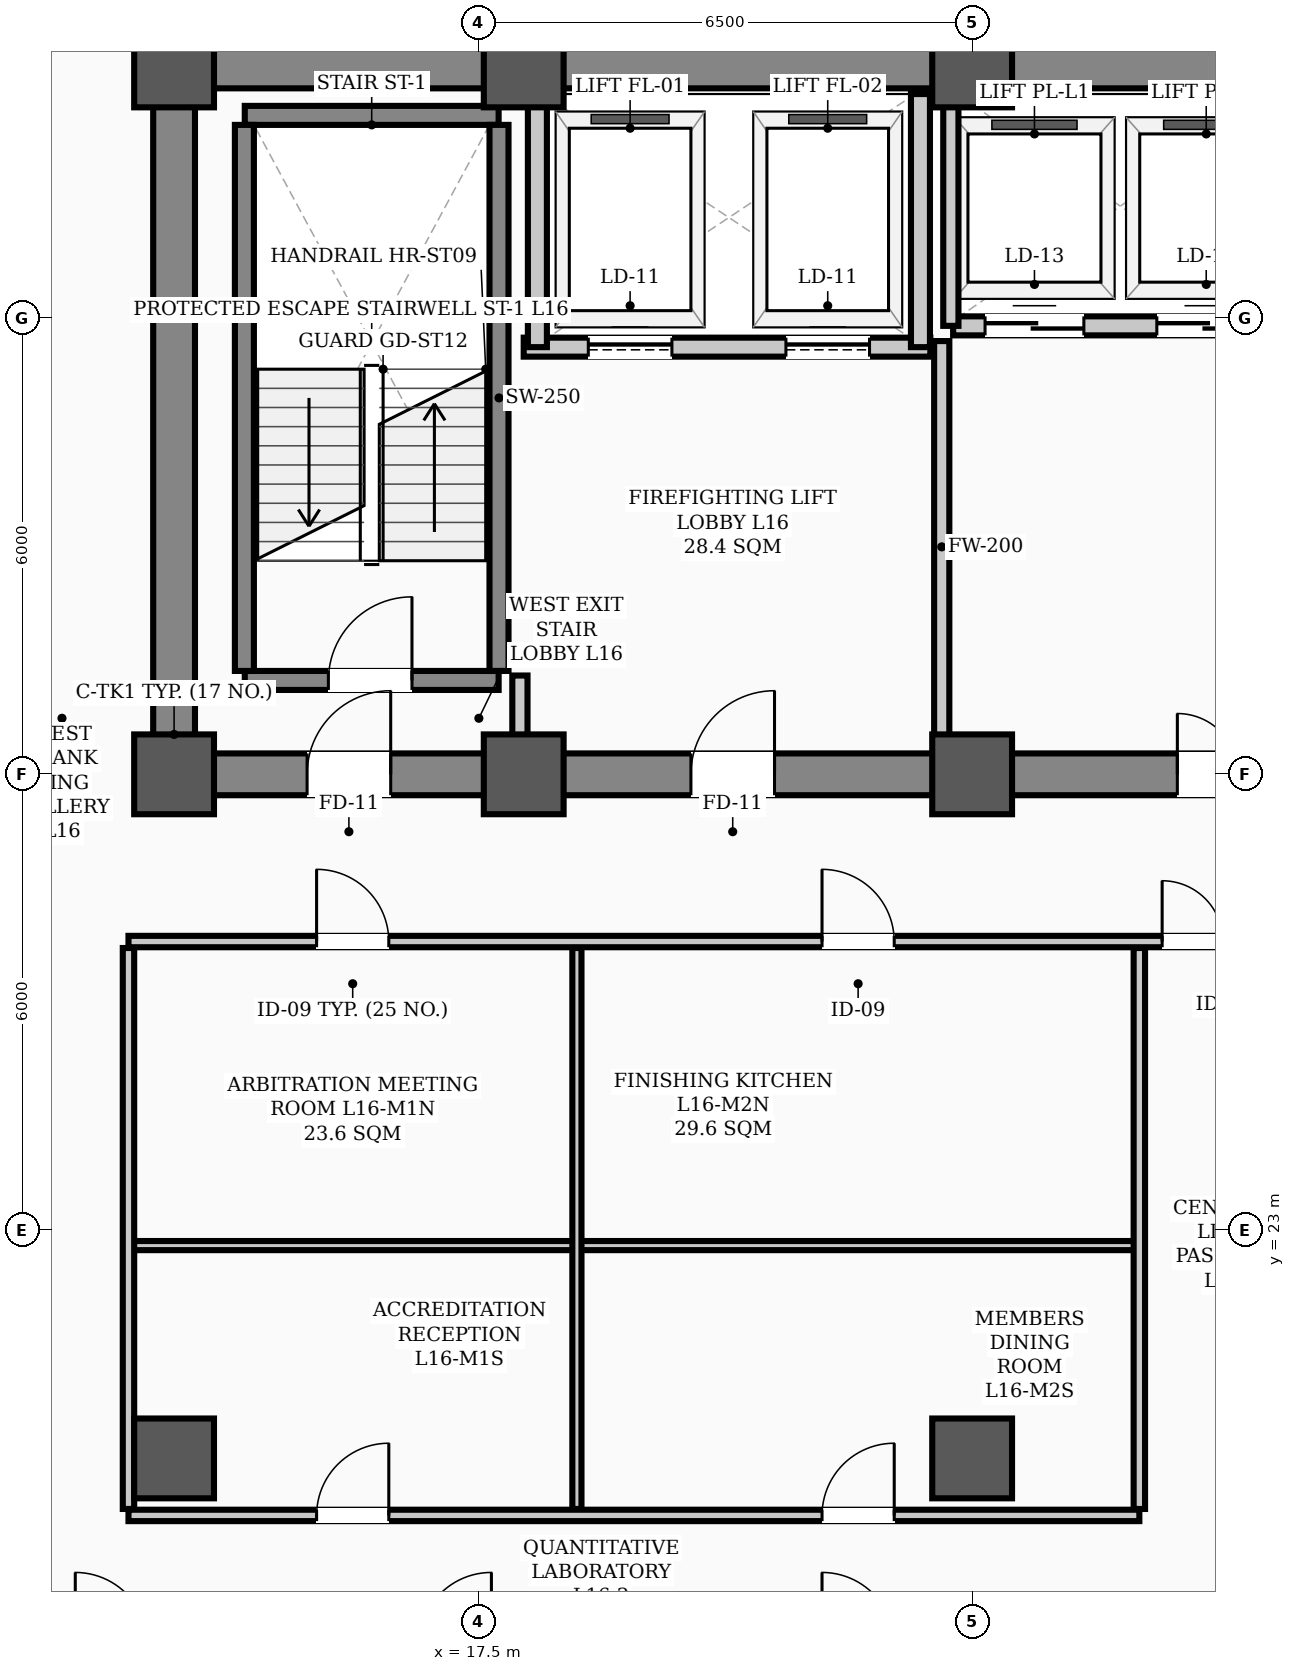
"""IFC4 building model, lengths in metres.
Left out: names, types, materials, properties, quantities, classifications, styles, units other than length and angle.
Written with IfcOpenShell. Run it as: python <this file> out.ifc"""

import sys

from ifc_helpers import new_model, si_unit, direction, frame, frame_2d, origin, origin_2d, place, context, subcontext, project, spatial, rectangle, hollow_rectangle, extrude, element, fill, save


model = new_model("IFC4")
c1 = context("Model", 3, precision=1e-05, world=origin(), true_north=direction((0.0, 1.0)))
c2 = subcontext(c1, "Body", "Model", "MODEL_VIEW")
j1 = project(units=[si_unit("LENGTHUNIT", "METRE"), si_unit("PLANEANGLEUNIT", "RADIAN")], contexts=[c1])
p1 = place(None, origin())
s1 = spatial("IfcSite", under=j1, at=p1, CompositionType="ELEMENT")
p2 = place(p1, origin())
s2 = spatial("IfcBuilding", under=s1, at=p2, CompositionType="ELEMENT")
p3 = place(p2, frame((0.0, 0.0, 65.5)))
s3 = spatial("IfcBuildingStorey", under=s2, at=p3, CompositionType="ELEMENT", Elevation=65.5)
for number, where, z_axis, x_axis in (
    (1, (13.5, 29.0, 0.0), (0.0, 0.0, 1.0), (1.0, 0.0, 0.0)),
    (2, (13.5, 38.3, 0.0), (0.0, 0.0, 1.0), (1.0, 0.0, 0.0)),
    (3, (18.1, 29.0, 0.0), (0.0, 0.0, 1.0), (1.0, 0.0, 0.0)),
    (4, (18.1, 38.3, 0.0), (0.0, 0.0, 1.0), (1.0, 0.0, 0.0)),
    (5, (24.0, 29.0, 0.0), (0.0, 0.0, 1.0), (1.0, 0.0, 0.0)),
    (6, (24.0, 38.3, 0.0), (0.0, 0.0, 1.0), (1.0, 0.0, 0.0)),
    (7, (13.5, 20.0, 0.0), (0.0, 0.0, 1.0), (1.0, 0.0, 0.0)),
    (8, (24.0, 20.0, 0.0), (0.0, 0.0, 1.0), (1.0, 0.0, 0.0)),
):
    element("IfcColumn", number, at=place(p3, frame(where, z_axis=z_axis, x_axis=x_axis)), inside=s3, PredefinedType="COLUMN", context=c2, shape_type="SweptSolid", body=[
        extrude(hollow_rectangle(XDim=1.05, YDim=1.05, WallThickness=0.038, InnerFilletRadius=0.019, OuterFilletRadius=0.057, at=origin_2d()), origin(), (0.0, 0.0, 1.0), 3.9),
    ])
p4 = place(p3, frame((13.5, 29.0, 0.0), z_axis=(0.0, 0.0, 1.0), x_axis=(1.0, 0.0, 0.0)))
e9 = element("IfcWall", 9, at=p4, inside=s3, PredefinedType="SHEAR", context=c2, shape_type="SweptSolid", body=[
    extrude(rectangle(XDim=30.5, YDim=0.55, at=frame_2d((15.25, 0.0))), origin(), (0.0, 0.0, 1.0), 3.72),
])
p5 = place(p4, frame((1.75, 0.0, 0.0)))
e10 = element("IfcOpeningElement", 10, at=p5, cuts=e9, PredefinedType="OPENING", context=c2, shape_type="SweptSolid", body=[
    extrude(rectangle(XDim=1.1, YDim=2.08, at=frame_2d((0.55, 1.04))), frame((0.0, 0.285, 0.0), z_axis=(0.0, -1.0, 0.0), x_axis=(1.0, 0.0, 0.0)), (0.0, 0.0, 1.0), 0.57),
])
p6 = place(p4, frame((26.7, 0.0, 0.0)))
e11 = element("IfcOpeningElement", 11, at=p6, cuts=e9, PredefinedType="OPENING", context=c2, shape_type="SweptSolid", body=[
    extrude(rectangle(XDim=1.1, YDim=2.08, at=frame_2d((0.55, 1.04))), frame((0.0, 0.285, 0.0), z_axis=(0.0, -1.0, 0.0), x_axis=(1.0, 0.0, 0.0)), (0.0, 0.0, 1.0), 0.57),
])
p7 = place(p4, frame((6.8, 0.0, 0.0)))
e12 = element("IfcOpeningElement", 12, at=p7, cuts=e9, PredefinedType="OPENING", context=c2, shape_type="SweptSolid", body=[
    extrude(rectangle(XDim=1.1, YDim=2.08, at=frame_2d((0.55, 1.04))), frame((0.0, 0.285, 0.0), z_axis=(0.0, -1.0, 0.0), x_axis=(1.0, 0.0, 0.0)), (0.0, 0.0, 1.0), 0.57),
])
p8 = place(p4, frame((13.2, 0.0, 0.0)))
e13 = element("IfcOpeningElement", 13, at=p8, cuts=e9, PredefinedType="OPENING", context=c2, shape_type="SweptSolid", body=[
    extrude(rectangle(XDim=1.6, YDim=2.08, at=frame_2d((0.8, 1.04))), frame((0.0, 0.285, 0.0), z_axis=(0.0, -1.0, 0.0), x_axis=(1.0, 0.0, 0.0)), (0.0, 0.0, 1.0), 0.57),
])
p9 = place(p4, frame((19.53, 0.0, 0.0)))
e14 = element("IfcOpeningElement", 14, at=p9, cuts=e9, PredefinedType="OPENING", context=c2, shape_type="SweptSolid", body=[
    extrude(rectangle(XDim=0.9, YDim=2.08, at=frame_2d((0.45, 1.04))), frame((0.0, 0.285, 0.0), z_axis=(0.0, -1.0, 0.0), x_axis=(1.0, 0.0, 0.0)), (0.0, 0.0, 1.0), 0.57),
])
p10 = place(p4, frame((21.57, 0.0, 0.0)))
e15 = element("IfcOpeningElement", 15, at=p10, cuts=e9, PredefinedType="OPENING", context=c2, shape_type="SweptSolid", body=[
    extrude(rectangle(XDim=0.9, YDim=2.08, at=frame_2d((0.45, 1.04))), frame((0.0, 0.285, 0.0), z_axis=(0.0, -1.0, 0.0), x_axis=(1.0, 0.0, 0.0)), (0.0, 0.0, 1.0), 0.57),
])
p11 = place(p3, frame((13.5, 38.3, 0.0), z_axis=(0.0, 0.0, 1.0), x_axis=(1.0, 0.0, 0.0)))
e16 = element("IfcWall", 16, at=p11, inside=s3, PredefinedType="SHEAR", context=c2, shape_type="SweptSolid", body=[
    extrude(rectangle(XDim=30.5, YDim=0.55, at=frame_2d((15.25, 0.0))), origin(), (0.0, 0.0, 1.0), 3.72),
])
p12 = place(p3, frame((13.5, 29.35, 0.0), z_axis=(0.0, 0.0, 1.0), x_axis=(0.0, 1.0, 0.0)))
e17 = element("IfcWall", 17, at=p12, inside=s3, PredefinedType="SHEAR", context=c2, shape_type="SweptSolid", body=[
    extrude(rectangle(XDim=8.6, YDim=0.55, at=frame_2d((4.3, 0.0))), origin(), (0.0, 0.0, 1.0), 3.72),
])
p13 = place(p3, frame((14.43, 30.235, 0.0), z_axis=(0.0, 0.0, 1.0), x_axis=(1.0, 0.0, 0.0)))
e18 = element("IfcWall", 18, at=p13, inside=s3, PredefinedType="STANDARD", context=c2, shape_type="SweptSolid", body=[
    extrude(rectangle(XDim=3.34, YDim=0.25, at=frame_2d((1.67, 0.0))), origin(), (0.0, 0.0, 1.0), 3.72),
])
p14 = place(p13, frame((1.1, 0.0, 0.0)))
e19 = element("IfcOpeningElement", 19, at=p14, cuts=e18, PredefinedType="OPENING", context=c2, shape_type="SweptSolid", body=[
    extrude(rectangle(XDim=1.1, YDim=2.08, at=frame_2d((0.55, 1.04))), frame((0.0, 0.135, 0.0), z_axis=(0.0, -1.0, 0.0), x_axis=(1.0, 0.0, 0.0)), (0.0, 0.0, 1.0), 0.27),
])
p15 = place(p3, frame((14.43, 37.669, 0.0), z_axis=(0.0, 0.0, 1.0), x_axis=(1.0, 0.0, 0.0)))
e20 = element("IfcWall", 20, at=p15, inside=s3, PredefinedType="STANDARD", context=c2, shape_type="SweptSolid", body=[
    extrude(rectangle(XDim=3.34, YDim=0.25, at=frame_2d((1.67, 0.0))), origin(), (0.0, 0.0, 1.0), 3.72),
])
for number, where, z_axis, x_axis in (
    (21, (14.425, 30.36, 0.0), (0.0, 0.0, 1.0), (0.0, 1.0, 0.0)),
    (22, (17.775, 30.36, 0.0), (0.0, 0.0, 1.0), (0.0, 1.0, 0.0)),
):
    element("IfcWall", number, at=place(p3, frame(where, z_axis=z_axis, x_axis=x_axis)), inside=s3, PredefinedType="STANDARD", context=c2, shape_type="SweptSolid", body=[
        extrude(rectangle(XDim=7.184, YDim=0.25, at=frame_2d((3.592, 0.0))), origin(), (0.0, 0.0, 1.0), 3.72),
    ])
p16 = place(p3, frame((18.1, 34.62, 0.0), z_axis=(0.0, 0.0, 1.0), x_axis=(1.0, 0.0, 0.0)))
e23 = element("IfcWall", 23, at=p16, inside=s3, PredefinedType="STANDARD", context=c2, shape_type="SweptSolid", body=[
    extrude(rectangle(XDim=5.35, YDim=0.25, at=frame_2d((2.675, 0.0))), origin(), (0.0, 0.0, 1.0), 3.72),
])
p17 = place(p16, frame((0.85, 0.0, 0.0)))
e24 = element("IfcOpeningElement", 24, at=p17, cuts=e23, PredefinedType="OPENING", context=c2, shape_type="SweptSolid", body=[
    extrude(rectangle(XDim=1.1, YDim=2.08, at=frame_2d((0.55, 1.04))), frame((0.0, 0.135, 0.0), z_axis=(0.0, -1.0, 0.0), x_axis=(1.0, 0.0, 0.0)), (0.0, 0.0, 1.0), 0.27),
])
p18 = place(p16, frame((3.45, 0.0, 0.0)))
e25 = element("IfcOpeningElement", 25, at=p18, cuts=e23, PredefinedType="OPENING", context=c2, shape_type="SweptSolid", body=[
    extrude(rectangle(XDim=1.1, YDim=2.08, at=frame_2d((0.55, 1.04))), frame((0.0, 0.135, 0.0), z_axis=(0.0, -1.0, 0.0), x_axis=(1.0, 0.0, 0.0)), (0.0, 0.0, 1.0), 0.27),
])
for number, where, z_axis, x_axis in (
    (26, (18.28, 34.62, 0.0), (0.0, 0.0, 1.0), (0.0, 1.0, 0.0)),
    (27, (23.32, 34.62, 0.0), (0.0, 0.0, 1.0), (0.0, 1.0, 0.0)),
):
    element("IfcWall", number, at=place(p3, frame(where, z_axis=z_axis, x_axis=x_axis)), inside=s3, PredefinedType="STANDARD", context=c2, shape_type="SweptSolid", body=[
        extrude(rectangle(XDim=3.33, YDim=0.25, at=frame_2d((1.665, 0.0))), origin(), (0.0, 0.0, 1.0), 3.3),
    ])
p19 = place(p3, frame((23.75, 34.9, 0.0), z_axis=(0.0, 0.0, 1.0), x_axis=(1.0, 0.0, 0.0)))
e28 = element("IfcWall", 28, at=p19, inside=s3, PredefinedType="STANDARD", context=c2, shape_type="SweptSolid", body=[
    extrude(rectangle(XDim=4.4, YDim=0.25, at=frame_2d((2.2, 0.0))), origin(), (0.0, 0.0, 1.0), 3.72),
])
p20 = place(p19, frame((0.42, 0.0, 0.0)))
e29 = element("IfcOpeningElement", 29, at=p20, cuts=e28, PredefinedType="OPENING", context=c2, shape_type="SweptSolid", body=[
    extrude(rectangle(XDim=1.3, YDim=2.08, at=frame_2d((0.65, 1.04))), frame((0.0, 0.135, 0.0), z_axis=(0.0, -1.0, 0.0), x_axis=(1.0, 0.0, 0.0)), (0.0, 0.0, 1.0), 0.27),
])
p21 = place(p19, frame((2.68, 0.0, 0.0)))
e30 = element("IfcOpeningElement", 30, at=p21, cuts=e28, PredefinedType="OPENING", context=c2, shape_type="SweptSolid", body=[
    extrude(rectangle(XDim=1.3, YDim=2.08, at=frame_2d((0.65, 1.04))), frame((0.0, 0.135, 0.0), z_axis=(0.0, -1.0, 0.0), x_axis=(1.0, 0.0, 0.0)), (0.0, 0.0, 1.0), 0.27),
])
p22 = place(p3, frame((12.9, 26.8, 0.0), z_axis=(0.0, 0.0, 1.0), x_axis=(1.0, 0.0, 0.0)))
e31 = element("IfcWall", 31, at=p22, inside=s3, PredefinedType="PARTITIONING", context=c2, shape_type="SweptSolid", body=[
    extrude(rectangle(XDim=31.7, YDim=0.15, at=frame_2d((15.85, 0.0))), origin(), (0.0, 0.0, 1.0), 3.1),
])
p23 = place(p22, frame((13.6, 0.0, 0.0)))
e32 = element("IfcOpeningElement", 32, at=p23, cuts=e31, PredefinedType="OPENING", context=c2, shape_type="SweptSolid", body=[
    extrude(rectangle(XDim=1.6, YDim=2.08, at=frame_2d((0.8, 1.04))), frame((0.0, 0.085, 0.0), z_axis=(0.0, -1.0, 0.0), x_axis=(1.0, 0.0, 0.0)), (0.0, 0.0, 1.0), 0.17),
])
p24 = place(p22, frame((2.475, 0.0, 0.0)))
e33 = element("IfcOpeningElement", 33, at=p24, cuts=e31, PredefinedType="OPENING", context=c2, shape_type="SweptSolid", body=[
    extrude(rectangle(XDim=0.95, YDim=2.08, at=frame_2d((0.475, 1.04))), frame((0.0, 0.085, 0.0), z_axis=(0.0, -1.0, 0.0), x_axis=(1.0, 0.0, 0.0)), (0.0, 0.0, 1.0), 0.17),
])
p25 = place(p22, frame((9.125, 0.0, 0.0)))
e34 = element("IfcOpeningElement", 34, at=p25, cuts=e31, PredefinedType="OPENING", context=c2, shape_type="SweptSolid", body=[
    extrude(rectangle(XDim=0.95, YDim=2.08, at=frame_2d((0.475, 1.04))), frame((0.0, 0.085, 0.0), z_axis=(0.0, -1.0, 0.0), x_axis=(1.0, 0.0, 0.0)), (0.0, 0.0, 1.0), 0.17),
])
p26 = place(p22, frame((19.125, 0.0, 0.0)))
e35 = element("IfcOpeningElement", 35, at=p26, cuts=e31, PredefinedType="OPENING", context=c2, shape_type="SweptSolid", body=[
    extrude(rectangle(XDim=0.95, YDim=2.08, at=frame_2d((0.475, 1.04))), frame((0.0, 0.085, 0.0), z_axis=(0.0, -1.0, 0.0), x_axis=(1.0, 0.0, 0.0)), (0.0, 0.0, 1.0), 0.17),
])
p27 = place(p22, frame((26.325, 0.0, 0.0)))
e36 = element("IfcOpeningElement", 36, at=p27, cuts=e31, PredefinedType="OPENING", context=c2, shape_type="SweptSolid", body=[
    extrude(rectangle(XDim=0.95, YDim=2.08, at=frame_2d((0.475, 1.04))), frame((0.0, 0.085, 0.0), z_axis=(0.0, -1.0, 0.0), x_axis=(1.0, 0.0, 0.0)), (0.0, 0.0, 1.0), 0.17),
])
p28 = place(p3, frame((12.9, 19.25, 0.0), z_axis=(0.0, 0.0, 1.0), x_axis=(1.0, 0.0, 0.0)))
e37 = element("IfcWall", 37, at=p28, inside=s3, PredefinedType="PARTITIONING", context=c2, shape_type="SweptSolid", body=[
    extrude(rectangle(XDim=13.3, YDim=0.15, at=frame_2d((6.65, 0.0))), origin(), (0.0, 0.0, 1.0), 3.1),
])
p29 = place(p28, frame((2.475, 0.0, 0.0)))
e38 = element("IfcOpeningElement", 38, at=p29, cuts=e37, PredefinedType="OPENING", context=c2, shape_type="SweptSolid", body=[
    extrude(rectangle(XDim=0.95, YDim=2.08, at=frame_2d((0.475, 1.04))), frame((0.0, 0.085, 0.0), z_axis=(0.0, -1.0, 0.0), x_axis=(1.0, 0.0, 0.0)), (0.0, 0.0, 1.0), 0.17),
])
p30 = place(p28, frame((9.125, 0.0, 0.0)))
e39 = element("IfcOpeningElement", 39, at=p30, cuts=e37, PredefinedType="OPENING", context=c2, shape_type="SweptSolid", body=[
    extrude(rectangle(XDim=0.95, YDim=2.08, at=frame_2d((0.475, 1.04))), frame((0.0, 0.085, 0.0), z_axis=(0.0, -1.0, 0.0), x_axis=(1.0, 0.0, 0.0)), (0.0, 0.0, 1.0), 0.17),
])
p31 = place(p3, frame((12.9, 22.8, 0.0), z_axis=(0.0, 0.0, 1.0), x_axis=(1.0, 0.0, 0.0)))
e40 = element("IfcWall", 40, at=p31, inside=s3, PredefinedType="PARTITIONING", context=c2, shape_type="SweptSolid", body=[
    extrude(rectangle(XDim=5.9, YDim=0.12, at=frame_2d((2.95, 0.0))), origin(), (0.0, 0.0, 1.0), 3.1),
])
p32 = place(p3, frame((18.8, 22.8, 0.0), z_axis=(0.0, 0.0, 1.0), x_axis=(1.0, 0.0, 0.0)))
e41 = element("IfcWall", 41, at=p32, inside=s3, PredefinedType="PARTITIONING", context=c2, shape_type="SweptSolid", body=[
    extrude(rectangle(XDim=7.4, YDim=0.12, at=frame_2d((3.7, 0.0))), origin(), (0.0, 0.0, 1.0), 3.1),
])
p33 = place(p3, frame((18.05, 29.285, 0.0), z_axis=(0.0, 0.0, 1.0), x_axis=(0.0, 1.0, 0.0)))
e42 = element("IfcWall", 42, at=p33, inside=s3, PredefinedType="STANDARD", context=c2, shape_type="SweptSolid", body=[
    extrude(rectangle(XDim=1.015, YDim=0.2, at=frame_2d((0.508, 0.0))), origin(), (0.0, 0.0, 1.0), 3.3),
])
p34 = place(p3, frame((23.6, 29.285, 0.0), z_axis=(0.0, 0.0, 1.0), x_axis=(0.0, 1.0, 0.0)))
e43 = element("IfcWall", 43, at=p34, inside=s3, PredefinedType="STANDARD", context=c2, shape_type="SweptSolid", body=[
    extrude(rectangle(XDim=5.415, YDim=0.2, at=frame_2d((2.708, 0.0))), origin(), (0.0, 0.0, 1.0), 3.1),
])
for number, where, z_axis, x_axis in (
    (44, (26.2, 19.335, 0.0), (0.0, 0.0, 1.0), (0.0, 1.0, 0.0)),
    (45, (12.9, 19.335, 0.0), (0.0, 0.0, 1.0), (0.0, 1.0, 0.0)),
):
    element("IfcWall", number, at=place(p3, frame(where, z_axis=z_axis, x_axis=x_axis)), inside=s3, PredefinedType="PARTITIONING", context=c2, shape_type="SweptSolid", body=[
        extrude(rectangle(XDim=7.38, YDim=0.15, at=frame_2d((3.69, 0.0))), origin(), (0.0, 0.0, 1.0), 3.0),
    ])
p35 = place(p3, frame((18.8, 19.335, 0.0), z_axis=(0.0, 0.0, 1.0), x_axis=(0.0, 1.0, 0.0)))
e46 = element("IfcWall", 46, at=p35, inside=s3, PredefinedType="PARTITIONING", context=c2, shape_type="SweptSolid", body=[
    extrude(rectangle(XDim=7.38, YDim=0.12, at=frame_2d((3.69, 0.0))), origin(), (0.0, 0.0, 1.0), 3.0),
])
p36 = place(p3, frame((23.72, 34.9, 0.0), z_axis=(0.0, 0.0, 1.0), x_axis=(0.0, 1.0, 0.0)))
e47 = element("IfcWall", 47, at=p36, inside=s3, PredefinedType="STANDARD", context=c2, shape_type="SweptSolid", body=[
    extrude(rectangle(XDim=3.12, YDim=0.2, at=frame_2d((1.56, 0.0))), origin(), (0.0, 0.0, 1.0), 3.1),
])
p37 = place(p14, origin())
e48 = element("IfcDoor", 48, at=p37, inside=s3, OperationType="SINGLE_SWING_RIGHT", PredefinedType="DOOR", context=c2, shape_type="SweptSolid", body=[
    extrude(rectangle(XDim=1.1, YDim=2.08, at=frame_2d((0.55, 1.04))), frame((0.0, 0.025, 0.0), z_axis=(0.0, -1.0, 0.0), x_axis=(1.0, 0.0, 0.0)), (0.0, 0.0, 1.0), 0.05),
])
fill(e19, e48)
p38 = place(p5, origin())
e49 = element("IfcDoor", 49, at=p38, inside=s3, OperationType="SINGLE_SWING_RIGHT", PredefinedType="DOOR", context=c2, shape_type="SweptSolid", body=[
    extrude(rectangle(XDim=1.1, YDim=2.08, at=frame_2d((0.55, 1.04))), frame((0.0, 0.025, 0.0), z_axis=(0.0, -1.0, 0.0), x_axis=(1.0, 0.0, 0.0)), (0.0, 0.0, 1.0), 0.05),
])
fill(e10, e49)
p39 = place(p7, origin())
e50 = element("IfcDoor", 50, at=p39, inside=s3, OperationType="SINGLE_SWING_RIGHT", PredefinedType="DOOR", context=c2, shape_type="SweptSolid", body=[
    extrude(rectangle(XDim=1.1, YDim=2.08, at=frame_2d((0.55, 1.04))), frame((0.0, 0.025, 0.0), z_axis=(0.0, -1.0, 0.0), x_axis=(1.0, 0.0, 0.0)), (0.0, 0.0, 1.0), 0.05),
])
fill(e12, e50)
p40 = place(p8, origin())
e51 = element("IfcDoor", 51, at=p40, inside=s3, OperationType="DOUBLE_DOOR_SINGLE_SWING", PredefinedType="DOOR", context=c2, shape_type="SweptSolid", body=[
    extrude(rectangle(XDim=1.6, YDim=2.08, at=frame_2d((0.8, 1.04))), frame((0.0, 0.025, 0.0), z_axis=(0.0, -1.0, 0.0), x_axis=(1.0, 0.0, 0.0)), (0.0, 0.0, 1.0), 0.05),
])
fill(e13, e51)
p41 = place(p23, origin())
e52 = element("IfcDoor", 52, at=p41, inside=s3, OperationType="DOUBLE_DOOR_SINGLE_SWING", PredefinedType="DOOR", context=c2, shape_type="SweptSolid", body=[
    extrude(rectangle(XDim=1.6, YDim=2.08, at=frame_2d((0.8, 1.04))), frame((0.0, 0.025, 0.0), z_axis=(0.0, -1.0, 0.0), x_axis=(1.0, 0.0, 0.0)), (0.0, 0.0, 1.0), 0.05),
])
fill(e32, e52)
p42 = place(p24, origin())
e53 = element("IfcDoor", 53, at=p42, inside=s3, OperationType="SINGLE_SWING_LEFT", PredefinedType="DOOR", context=c2, shape_type="SweptSolid", body=[
    extrude(rectangle(XDim=0.95, YDim=2.08, at=frame_2d((0.475, 1.04))), frame((0.0, 0.025, 0.0), z_axis=(0.0, -1.0, 0.0), x_axis=(1.0, 0.0, 0.0)), (0.0, 0.0, 1.0), 0.05),
])
fill(e33, e53)
p43 = place(p29, origin())
e54 = element("IfcDoor", 54, at=p43, inside=s3, OperationType="SINGLE_SWING_RIGHT", PredefinedType="DOOR", context=c2, shape_type="SweptSolid", body=[
    extrude(rectangle(XDim=0.95, YDim=2.08, at=frame_2d((0.475, 1.04))), frame((0.0, 0.025, 0.0), z_axis=(0.0, -1.0, 0.0), x_axis=(1.0, 0.0, 0.0)), (0.0, 0.0, 1.0), 0.05),
])
fill(e38, e54)
p44 = place(p25, origin())
e55 = element("IfcDoor", 55, at=p44, inside=s3, OperationType="SINGLE_SWING_LEFT", PredefinedType="DOOR", context=c2, shape_type="SweptSolid", body=[
    extrude(rectangle(XDim=0.95, YDim=2.08, at=frame_2d((0.475, 1.04))), frame((0.0, 0.025, 0.0), z_axis=(0.0, -1.0, 0.0), x_axis=(1.0, 0.0, 0.0)), (0.0, 0.0, 1.0), 0.05),
])
fill(e34, e55)
p45 = place(p30, origin())
e56 = element("IfcDoor", 56, at=p45, inside=s3, OperationType="SINGLE_SWING_RIGHT", PredefinedType="DOOR", context=c2, shape_type="SweptSolid", body=[
    extrude(rectangle(XDim=0.95, YDim=2.08, at=frame_2d((0.475, 1.04))), frame((0.0, 0.025, 0.0), z_axis=(0.0, -1.0, 0.0), x_axis=(1.0, 0.0, 0.0)), (0.0, 0.0, 1.0), 0.05),
])
fill(e39, e56)
p46 = place(p17, origin())
e57 = element("IfcDoor", 57, at=p46, inside=s3, OperationType="SLIDING_TO_LEFT", PredefinedType="DOOR", context=c2, shape_type="SweptSolid", body=[
    extrude(rectangle(XDim=1.1, YDim=2.08, at=frame_2d((0.55, 1.04))), frame((0.0, 0.025, 0.0), z_axis=(0.0, -1.0, 0.0), x_axis=(1.0, 0.0, 0.0)), (0.0, 0.0, 1.0), 0.05),
])
fill(e24, e57)
p47 = place(p18, origin())
e58 = element("IfcDoor", 58, at=p47, inside=s3, OperationType="SLIDING_TO_LEFT", PredefinedType="DOOR", context=c2, shape_type="SweptSolid", body=[
    extrude(rectangle(XDim=1.1, YDim=2.08, at=frame_2d((0.55, 1.04))), frame((0.0, 0.025, 0.0), z_axis=(0.0, -1.0, 0.0), x_axis=(1.0, 0.0, 0.0)), (0.0, 0.0, 1.0), 0.05),
])
fill(e25, e58)
p48 = place(p20, origin())
e59 = element("IfcDoor", 59, at=p48, inside=s3, OperationType="DOUBLE_DOOR_SLIDING", PredefinedType="DOOR", context=c2, shape_type="SweptSolid", body=[
    extrude(rectangle(XDim=1.3, YDim=2.08, at=frame_2d((0.65, 1.04))), frame((0.0, 0.025, 0.0), z_axis=(0.0, -1.0, 0.0), x_axis=(1.0, 0.0, 0.0)), (0.0, 0.0, 1.0), 0.05),
])
fill(e29, e59)
p49 = place(p21, origin())
e60 = element("IfcDoor", 60, at=p49, inside=s3, OperationType="DOUBLE_DOOR_SLIDING", PredefinedType="DOOR", context=c2, shape_type="SweptSolid", body=[
    extrude(rectangle(XDim=1.3, YDim=2.08, at=frame_2d((0.65, 1.04))), frame((0.0, 0.025, 0.0), z_axis=(0.0, -1.0, 0.0), x_axis=(1.0, 0.0, 0.0)), (0.0, 0.0, 1.0), 0.05),
])
fill(e30, e60)
save(model, sys.argv[1])
